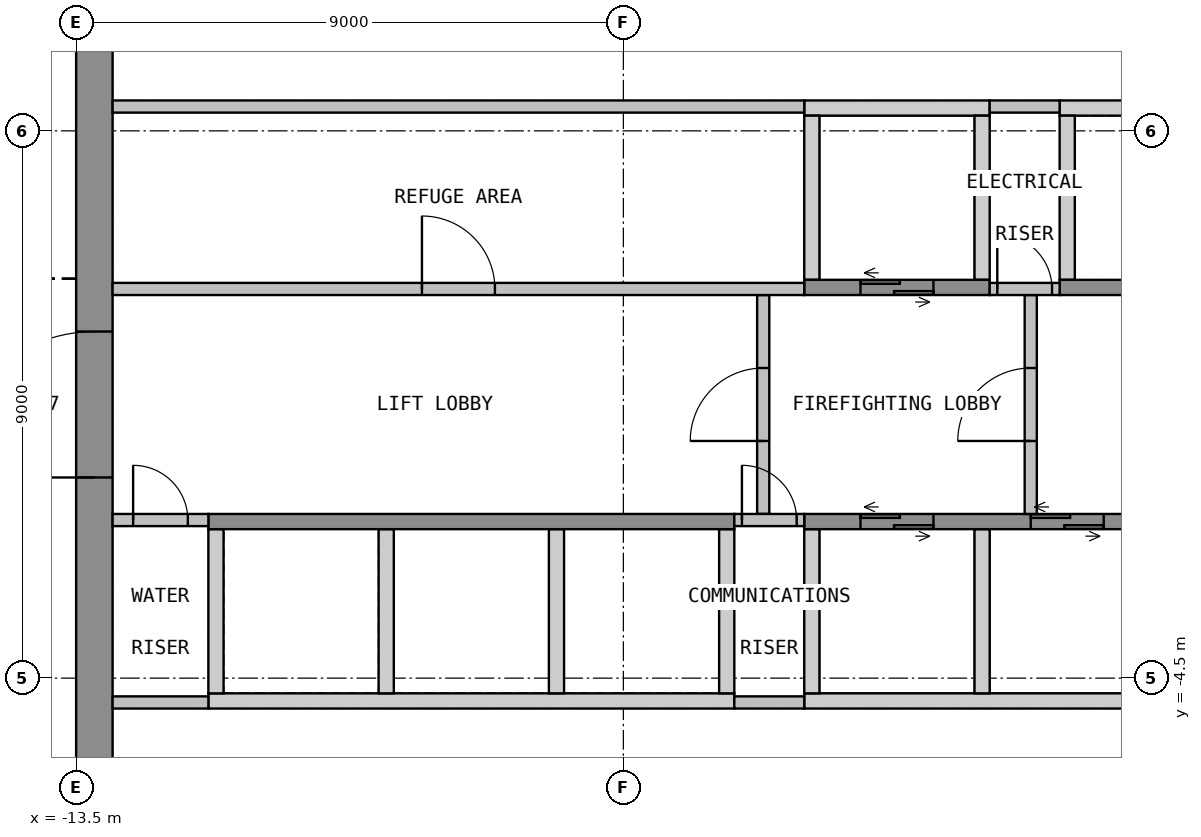
"""IFC4 building model, lengths in metres.
Left out: names, types, materials, properties, quantities, classifications, styles, units other than length and angle.
Written with IfcOpenShell. Run it as: python <this file> out.ifc"""

import sys

from ifc_helpers import new_model, si_unit, direction, frame, frame_2d, origin, place, context, subcontext, project, spatial, polyline, rectangle, outline, extrude, element, fill, save


model = new_model("IFC4")
c1 = context("Model", 3, precision=1e-05, world=origin(), true_north=direction((0.0, 1.0)))
c2 = subcontext(c1, "Body", "Model", "MODEL_VIEW")
j1 = project(units=[si_unit("LENGTHUNIT", "METRE"), si_unit("PLANEANGLEUNIT", "RADIAN")], contexts=[c1])
p1 = place(None, origin())
s1 = spatial("IfcSite", under=j1, at=p1, CompositionType="ELEMENT")
p2 = place(p1, origin())
s2 = spatial("IfcBuilding", under=s1, at=p2, CompositionType="ELEMENT")
p3 = place(p2, frame((0.0, 0.0, 230.7)))
s3 = spatial("IfcBuildingStorey", under=s2, at=p3, CompositionType="ELEMENT", Elevation=230.7)
p4 = place(p3, frame((-13.2, -10.65, 0.0), z_axis=(0.0, 0.0, 1.0), x_axis=(0.0, 1.0, 0.0)))
e1 = element("IfcWall", 1, at=p4, inside=s3, PredefinedType="SHEAR", context=c2, shape_type="SweptSolid", body=[
    extrude(rectangle(XDim=21.3, YDim=0.6, at=frame_2d((10.65, 0.0))), origin(), (0.0, 0.0, 1.0), 4.175),
])
p5 = place(p4, frame((9.45, 0.0, 0.0)))
e2 = element("IfcOpeningElement", 2, at=p5, cuts=e1, PredefinedType="OPENING", context=c2, shape_type="SweptSolid", body=[
    extrude(rectangle(XDim=2.4, YDim=2.1, at=frame_2d((1.2, 1.05))), frame((0.0, 0.31, 0.0), z_axis=(0.0, -1.0, 0.0), x_axis=(1.0, 0.0, 0.0)), (0.0, 0.0, 1.0), 0.62),
])
p6 = place(p3, origin())
e3 = element("IfcWall", 3, at=p6, inside=s3, PredefinedType="SHEAR", context=c2, shape_type="SweptSolid", body=[
    extrude(outline(polyline([(-1.525, 4.75), (1.525, 4.75), (1.525, 5.0), (-1.525, 5.0), (-1.525, 4.75)])), origin(), (0.0, 0.0, 1.0), 4.175),
])
p7 = place(p3, origin())
e4 = element("IfcWall", 4, at=p7, inside=s3, PredefinedType="SHEAR", context=c2, shape_type="SweptSolid", body=[
    extrude(outline(polyline([(2.675, 4.75), (8.525, 4.75), (8.525, 5.0), (2.675, 5.0), (2.675, 4.75)])), origin(), (0.0, 0.0, 1.0), 4.175),
])
p8 = place(p3, origin())
e5 = element("IfcWall", 5, at=p8, inside=s3, PredefinedType="SHEAR", context=c2, shape_type="SweptSolid", body=[
    extrude(outline(polyline([(-1.525, 2.05), (-1.275, 2.05), (-1.275, 4.75), (-1.525, 4.75), (-1.525, 2.05)])), origin(), (0.0, 0.0, 1.0), 4.175),
])
p9 = place(p3, origin())
e6 = element("IfcWall", 6, at=p9, inside=s3, PredefinedType="SHEAR", context=c2, shape_type="SweptSolid", body=[
    extrude(outline(polyline([(1.275, 2.05), (1.525, 2.05), (1.525, 4.75), (1.275, 4.75), (1.275, 2.05)])), origin(), (0.0, 0.0, 1.0), 4.175),
])
p10 = place(p3, origin())
e7 = element("IfcWall", 7, at=p10, inside=s3, PredefinedType="SHEAR", context=c2, shape_type="SweptSolid", body=[
    extrude(outline(polyline([(2.675, 2.05), (2.925, 2.05), (2.925, 4.75), (2.675, 4.75), (2.675, 2.05)])), origin(), (0.0, 0.0, 1.0), 4.175),
])
p11 = place(p3, frame((-1.525, 1.925, 0.0), z_axis=(0.0, 0.0, 1.0), x_axis=(1.0, 0.0, 0.0)))
e8 = element("IfcWall", 8, at=p11, inside=s3, PredefinedType="SHEAR", context=c2, shape_type="SweptSolid", body=[
    extrude(rectangle(XDim=3.05, YDim=0.25, at=frame_2d((1.525, 0.0))), origin(), (0.0, 0.0, 1.0), 4.175),
])
p12 = place(p11, frame((0.925, 0.0, 0.0)))
e9 = element("IfcOpeningElement", 9, at=p12, cuts=e8, PredefinedType="OPENING", context=c2, shape_type="SweptSolid", body=[
    extrude(rectangle(XDim=1.2, YDim=2.1, at=frame_2d((0.6, 1.05))), frame((0.0, 0.135, 0.0), z_axis=(0.0, -1.0, 0.0), x_axis=(1.0, 0.0, 0.0)), (0.0, 0.0, 1.0), 0.27),
])
p13 = place(p3, frame((2.675, 1.925, 0.0), z_axis=(0.0, 0.0, 1.0), x_axis=(1.0, 0.0, 0.0)))
e10 = element("IfcWall", 10, at=p13, inside=s3, PredefinedType="SHEAR", context=c2, shape_type="SweptSolid", body=[
    extrude(rectangle(XDim=5.85, YDim=0.25, at=frame_2d((2.925, 0.0))), origin(), (0.0, 0.0, 1.0), 4.175),
])
p14 = place(p3, origin())
e11 = element("IfcWall", 11, at=p14, inside=s3, PredefinedType="SHEAR", context=c2, shape_type="SweptSolid", body=[
    extrude(outline(polyline([(-11.325, -5.0), (-2.675, -5.0), (-2.675, -4.75), (-11.325, -4.75), (-11.325, -5.0)])), origin(), (0.0, 0.0, 1.0), 4.175),
])
p15 = place(p3, origin())
e12 = element("IfcWall", 12, at=p15, inside=s3, PredefinedType="SHEAR", context=c2, shape_type="SweptSolid", body=[
    extrude(outline(polyline([(-1.525, -5.0), (12.9, -5.0), (12.9, -4.75), (-1.525, -4.75), (-1.525, -5.0)])), origin(), (0.0, 0.0, 1.0), 4.175),
])
p16 = place(p3, origin())
e13 = element("IfcWall", 13, at=p16, inside=s3, PredefinedType="SHEAR", context=c2, shape_type="SweptSolid", body=[
    extrude(outline(polyline([(-11.325, -4.75), (-11.075, -4.75), (-11.075, -2.05), (-11.325, -2.05), (-11.325, -4.75)])), origin(), (0.0, 0.0, 1.0), 4.175),
])
p17 = place(p3, origin())
e14 = element("IfcWall", 14, at=p17, inside=s3, PredefinedType="SHEAR", context=c2, shape_type="SweptSolid", body=[
    extrude(outline(polyline([(-8.525, -4.75), (-8.275, -4.75), (-8.275, -2.05), (-8.525, -2.05), (-8.525, -4.75)])), origin(), (0.0, 0.0, 1.0), 4.175),
])
p18 = place(p3, origin())
e15 = element("IfcWall", 15, at=p18, inside=s3, PredefinedType="SHEAR", context=c2, shape_type="SweptSolid", body=[
    extrude(outline(polyline([(-5.725, -4.75), (-5.475, -4.75), (-5.475, -2.05), (-5.725, -2.05), (-5.725, -4.75)])), origin(), (0.0, 0.0, 1.0), 4.175),
])
p19 = place(p3, origin())
e16 = element("IfcWall", 16, at=p19, inside=s3, PredefinedType="SHEAR", context=c2, shape_type="SweptSolid", body=[
    extrude(outline(polyline([(-2.925, -4.75), (-2.675, -4.75), (-2.675, -2.05), (-2.925, -2.05), (-2.925, -4.75)])), origin(), (0.0, 0.0, 1.0), 4.175),
])
p20 = place(p3, origin())
e17 = element("IfcWall", 17, at=p20, inside=s3, PredefinedType="SHEAR", context=c2, shape_type="SweptSolid", body=[
    extrude(outline(polyline([(-1.525, -4.75), (-1.275, -4.75), (-1.275, -2.05), (-1.525, -2.05), (-1.525, -4.75)])), origin(), (0.0, 0.0, 1.0), 4.175),
])
p21 = place(p3, origin())
e18 = element("IfcWall", 18, at=p21, inside=s3, PredefinedType="SHEAR", context=c2, shape_type="SweptSolid", body=[
    extrude(outline(polyline([(1.275, -4.75), (1.525, -4.75), (1.525, -2.05), (1.275, -2.05), (1.275, -4.75)])), origin(), (0.0, 0.0, 1.0), 4.175),
])
p22 = place(p3, frame((-11.325, -1.925, 0.0), z_axis=(0.0, 0.0, 1.0), x_axis=(1.0, 0.0, 0.0)))
e19 = element("IfcWall", 19, at=p22, inside=s3, PredefinedType="SHEAR", context=c2, shape_type="SweptSolid", body=[
    extrude(rectangle(XDim=8.65, YDim=0.25, at=frame_2d((4.325, 0.0))), origin(), (0.0, 0.0, 1.0), 4.175),
])
p23 = place(p3, frame((-1.525, -1.925, 0.0), z_axis=(0.0, 0.0, 1.0), x_axis=(1.0, 0.0, 0.0)))
e20 = element("IfcWall", 20, at=p23, inside=s3, PredefinedType="SHEAR", context=c2, shape_type="SweptSolid", body=[
    extrude(rectangle(XDim=14.425, YDim=0.25, at=frame_2d((7.212, 0.0))), origin(), (0.0, 0.0, 1.0), 4.175),
])
p24 = place(p23, frame((0.925, 0.0, 0.0)))
e21 = element("IfcOpeningElement", 21, at=p24, cuts=e20, PredefinedType="OPENING", context=c2, shape_type="SweptSolid", body=[
    extrude(rectangle(XDim=1.2, YDim=2.1, at=frame_2d((0.6, 1.05))), frame((0.0, 0.135, 0.0), z_axis=(0.0, -1.0, 0.0), x_axis=(1.0, 0.0, 0.0)), (0.0, 0.0, 1.0), 0.27),
])
p25 = place(p23, frame((3.725, 0.0, 0.0)))
e22 = element("IfcOpeningElement", 22, at=p25, cuts=e20, PredefinedType="OPENING", context=c2, shape_type="SweptSolid", body=[
    extrude(rectangle(XDim=1.2, YDim=2.1, at=frame_2d((0.6, 1.05))), frame((0.0, 0.135, 0.0), z_axis=(0.0, -1.0, 0.0), x_axis=(1.0, 0.0, 0.0)), (0.0, 0.0, 1.0), 0.27),
])
p26 = place(p3, frame((-2.2, -1.8, 0.0), z_axis=(0.0, 0.0, 1.0), x_axis=(0.0, 1.0, 0.0)))
e23 = element("IfcWall", 23, at=p26, inside=s3, PredefinedType="PARTITIONING", context=c2, shape_type="SweptSolid", body=[
    extrude(rectangle(XDim=3.6, YDim=0.2, at=frame_2d((1.8, 0.0))), origin(), (0.0, 0.0, 1.0), 4.175),
])
p27 = place(p26, frame((1.2, 0.0, 0.0)))
e24 = element("IfcOpeningElement", 24, at=p27, cuts=e23, PredefinedType="OPENING", context=c2, shape_type="SweptSolid", body=[
    extrude(rectangle(XDim=1.2, YDim=2.1, at=frame_2d((0.6, 1.05))), frame((0.0, 0.11, 0.0), z_axis=(0.0, -1.0, 0.0), x_axis=(1.0, 0.0, 0.0)), (0.0, 0.0, 1.0), 0.22),
])
p28 = place(p3, frame((2.2, -1.8, 0.0), z_axis=(0.0, 0.0, 1.0), x_axis=(0.0, 1.0, 0.0)))
e25 = element("IfcWall", 25, at=p28, inside=s3, PredefinedType="PARTITIONING", context=c2, shape_type="SweptSolid", body=[
    extrude(rectangle(XDim=3.6, YDim=0.2, at=frame_2d((1.8, 0.0))), origin(), (0.0, 0.0, 1.0), 4.175),
])
p29 = place(p28, frame((1.2, 0.0, 0.0)))
e26 = element("IfcOpeningElement", 26, at=p29, cuts=e25, PredefinedType="OPENING", context=c2, shape_type="SweptSolid", body=[
    extrude(rectangle(XDim=1.2, YDim=2.1, at=frame_2d((0.6, 1.05))), frame((0.0, 0.11, 0.0), z_axis=(0.0, -1.0, 0.0), x_axis=(1.0, 0.0, 0.0)), (0.0, 0.0, 1.0), 0.22),
])
p30 = place(p3, frame((-12.9, 1.9, 0.0), z_axis=(0.0, 0.0, 1.0), x_axis=(1.0, 0.0, 0.0)))
e27 = element("IfcWall", 27, at=p30, inside=s3, PredefinedType="PARTITIONING", context=c2, shape_type="SweptSolid", body=[
    extrude(rectangle(XDim=11.375, YDim=0.2, at=frame_2d((5.688, 0.0))), origin(), (0.0, 0.0, 1.0), 4.175),
])
p31 = place(p30, frame((5.087, 0.0, 0.0)))
e28 = element("IfcOpeningElement", 28, at=p31, cuts=e27, PredefinedType="OPENING", context=c2, shape_type="SweptSolid", body=[
    extrude(rectangle(XDim=1.2, YDim=2.1, at=frame_2d((0.6, 1.05))), frame((0.0, 0.11, 0.0), z_axis=(0.0, -1.0, 0.0), x_axis=(1.0, 0.0, 0.0)), (0.0, 0.0, 1.0), 0.22),
])
p32 = place(p3, frame((-12.9, 4.9, 0.0), z_axis=(0.0, 0.0, 1.0), x_axis=(1.0, 0.0, 0.0)))
e29 = element("IfcWall", 29, at=p32, inside=s3, PredefinedType="PARTITIONING", context=c2, shape_type="SweptSolid", body=[
    extrude(rectangle(XDim=11.375, YDim=0.2, at=frame_2d((5.688, 0.0))), origin(), (0.0, 0.0, 1.0), 4.175),
])
p33 = place(p3, frame((1.525, 1.9, 0.0), z_axis=(0.0, 0.0, 1.0), x_axis=(1.0, 0.0, 0.0)))
e30 = element("IfcWall", 30, at=p33, inside=s3, PredefinedType="PARTITIONING", context=c2, shape_type="SweptSolid", body=[
    extrude(rectangle(XDim=1.15, YDim=0.2, at=frame_2d((0.575, 0.0))), origin(), (0.0, 0.0, 1.0), 4.175),
])
p34 = place(p33, frame((0.125, 0.0, 0.0)))
e31 = element("IfcOpeningElement", 31, at=p34, cuts=e30, PredefinedType="OPENING", context=c2, shape_type="SweptSolid", body=[
    extrude(rectangle(XDim=0.9, YDim=2.1, at=frame_2d((0.45, 1.05))), frame((0.0, 0.11, 0.0), z_axis=(0.0, -1.0, 0.0), x_axis=(1.0, 0.0, 0.0)), (0.0, 0.0, 1.0), 0.22),
])
p35 = place(p3, frame((1.525, 4.9, 0.0), z_axis=(0.0, 0.0, 1.0), x_axis=(1.0, 0.0, 0.0)))
e32 = element("IfcWall", 32, at=p35, inside=s3, PredefinedType="PARTITIONING", context=c2, shape_type="SweptSolid", body=[
    extrude(rectangle(XDim=1.15, YDim=0.2, at=frame_2d((0.575, 0.0))), origin(), (0.0, 0.0, 1.0), 4.175),
])
p36 = place(p3, frame((-12.9, -1.9, 0.0), z_axis=(0.0, 0.0, 1.0), x_axis=(1.0, 0.0, 0.0)))
e33 = element("IfcWall", 33, at=p36, inside=s3, PredefinedType="PARTITIONING", context=c2, shape_type="SweptSolid", body=[
    extrude(rectangle(XDim=1.575, YDim=0.2, at=frame_2d((0.788, 0.0))), origin(), (0.0, 0.0, 1.0), 4.175),
])
p37 = place(p36, frame((0.337, 0.0, 0.0)))
e34 = element("IfcOpeningElement", 34, at=p37, cuts=e33, PredefinedType="OPENING", context=c2, shape_type="SweptSolid", body=[
    extrude(rectangle(XDim=0.9, YDim=2.1, at=frame_2d((0.45, 1.05))), frame((0.0, 0.11, 0.0), z_axis=(0.0, -1.0, 0.0), x_axis=(1.0, 0.0, 0.0)), (0.0, 0.0, 1.0), 0.22),
])
p38 = place(p3, frame((-12.9, -4.9, 0.0), z_axis=(0.0, 0.0, 1.0), x_axis=(1.0, 0.0, 0.0)))
e35 = element("IfcWall", 35, at=p38, inside=s3, PredefinedType="PARTITIONING", context=c2, shape_type="SweptSolid", body=[
    extrude(rectangle(XDim=1.575, YDim=0.2, at=frame_2d((0.788, 0.0))), origin(), (0.0, 0.0, 1.0), 4.175),
])
p39 = place(p3, frame((-2.675, -1.9, 0.0), z_axis=(0.0, 0.0, 1.0), x_axis=(1.0, 0.0, 0.0)))
e36 = element("IfcWall", 36, at=p39, inside=s3, PredefinedType="PARTITIONING", context=c2, shape_type="SweptSolid", body=[
    extrude(rectangle(XDim=1.15, YDim=0.2, at=frame_2d((0.575, 0.0))), origin(), (0.0, 0.0, 1.0), 4.175),
])
p40 = place(p39, frame((0.125, 0.0, 0.0)))
e37 = element("IfcOpeningElement", 37, at=p40, cuts=e36, PredefinedType="OPENING", context=c2, shape_type="SweptSolid", body=[
    extrude(rectangle(XDim=0.9, YDim=2.1, at=frame_2d((0.45, 1.05))), frame((0.0, 0.11, 0.0), z_axis=(0.0, -1.0, 0.0), x_axis=(1.0, 0.0, 0.0)), (0.0, 0.0, 1.0), 0.22),
])
p41 = place(p3, frame((-2.675, -4.9, 0.0), z_axis=(0.0, 0.0, 1.0), x_axis=(1.0, 0.0, 0.0)))
e38 = element("IfcWall", 38, at=p41, inside=s3, PredefinedType="PARTITIONING", context=c2, shape_type="SweptSolid", body=[
    extrude(rectangle(XDim=1.15, YDim=0.2, at=frame_2d((0.575, 0.0))), origin(), (0.0, 0.0, 1.0), 4.175),
])
p42 = place(p5, origin())
e39 = element("IfcDoor", 39, at=p42, inside=s3, OperationType="DOUBLE_DOOR_DOUBLE_SWING", PredefinedType="DOOR", context=c2, shape_type="SweptSolid", body=[
    extrude(rectangle(XDim=2.4, YDim=2.1, at=frame_2d((1.2, 1.05))), frame((0.0, 0.025, 0.0), z_axis=(0.0, -1.0, 0.0), x_axis=(1.0, 0.0, 0.0)), (0.0, 0.0, 1.0), 0.05),
])
fill(e2, e39)
p43 = place(p12, origin())
e40 = element("IfcDoor", 40, at=p43, inside=s3, OperationType="DOUBLE_DOOR_SLIDING", PredefinedType="DOOR", context=c2, shape_type="SweptSolid", body=[
    extrude(rectangle(XDim=1.2, YDim=2.1, at=frame_2d((0.6, 1.05))), frame((0.0, 0.025, 0.0), z_axis=(0.0, -1.0, 0.0), x_axis=(1.0, 0.0, 0.0)), (0.0, 0.0, 1.0), 0.05),
])
fill(e9, e40)
p44 = place(p24, origin())
e41 = element("IfcDoor", 41, at=p44, inside=s3, OperationType="DOUBLE_DOOR_SLIDING", PredefinedType="DOOR", context=c2, shape_type="SweptSolid", body=[
    extrude(rectangle(XDim=1.2, YDim=2.1, at=frame_2d((0.6, 1.05))), frame((0.0, 0.025, 0.0), z_axis=(0.0, -1.0, 0.0), x_axis=(1.0, 0.0, 0.0)), (0.0, 0.0, 1.0), 0.05),
])
fill(e21, e41)
p45 = place(p25, origin())
e42 = element("IfcDoor", 42, at=p45, inside=s3, OperationType="DOUBLE_DOOR_SLIDING", PredefinedType="DOOR", context=c2, shape_type="SweptSolid", body=[
    extrude(rectangle(XDim=1.2, YDim=2.1, at=frame_2d((0.6, 1.05))), frame((0.0, 0.025, 0.0), z_axis=(0.0, -1.0, 0.0), x_axis=(1.0, 0.0, 0.0)), (0.0, 0.0, 1.0), 0.05),
])
fill(e22, e42)
p46 = place(p27, origin())
e43 = element("IfcDoor", 43, at=p46, inside=s3, OperationType="SINGLE_SWING_LEFT", PredefinedType="DOOR", context=c2, shape_type="SweptSolid", body=[
    extrude(rectangle(XDim=1.2, YDim=2.1, at=frame_2d((0.6, 1.05))), frame((0.0, 0.025, 0.0), z_axis=(0.0, -1.0, 0.0), x_axis=(1.0, 0.0, 0.0)), (0.0, 0.0, 1.0), 0.05),
])
fill(e24, e43)
p47 = place(p29, origin())
e44 = element("IfcDoor", 44, at=p47, inside=s3, OperationType="SINGLE_SWING_LEFT", PredefinedType="DOOR", context=c2, shape_type="SweptSolid", body=[
    extrude(rectangle(XDim=1.2, YDim=2.1, at=frame_2d((0.6, 1.05))), frame((0.0, 0.025, 0.0), z_axis=(0.0, -1.0, 0.0), x_axis=(1.0, 0.0, 0.0)), (0.0, 0.0, 1.0), 0.05),
])
fill(e26, e44)
p48 = place(p31, origin())
e45 = element("IfcDoor", 45, at=p48, inside=s3, OperationType="SINGLE_SWING_RIGHT", PredefinedType="DOOR", context=c2, shape_type="SweptSolid", body=[
    extrude(rectangle(XDim=1.2, YDim=2.1, at=frame_2d((0.6, 1.05))), frame((0.0, 0.025, 0.0), z_axis=(0.0, -1.0, 0.0), x_axis=(1.0, 0.0, 0.0)), (0.0, 0.0, 1.0), 0.05),
])
fill(e28, e45)
p49 = place(p34, origin())
e46 = element("IfcDoor", 46, at=p49, inside=s3, OperationType="SINGLE_SWING_LEFT", PredefinedType="DOOR", context=c2, shape_type="SweptSolid", body=[
    extrude(rectangle(XDim=0.9, YDim=2.1, at=frame_2d((0.45, 1.05))), frame((0.0, 0.025, 0.0), z_axis=(0.0, -1.0, 0.0), x_axis=(1.0, 0.0, 0.0)), (0.0, 0.0, 1.0), 0.05),
])
fill(e31, e46)
p50 = place(p37, origin())
e47 = element("IfcDoor", 47, at=p50, inside=s3, OperationType="SINGLE_SWING_LEFT", PredefinedType="DOOR", context=c2, shape_type="SweptSolid", body=[
    extrude(rectangle(XDim=0.9, YDim=2.1, at=frame_2d((0.45, 1.05))), frame((0.0, 0.025, 0.0), z_axis=(0.0, -1.0, 0.0), x_axis=(1.0, 0.0, 0.0)), (0.0, 0.0, 1.0), 0.05),
])
fill(e34, e47)
p51 = place(p40, origin())
e48 = element("IfcDoor", 48, at=p51, inside=s3, OperationType="SINGLE_SWING_LEFT", PredefinedType="DOOR", context=c2, shape_type="SweptSolid", body=[
    extrude(rectangle(XDim=0.9, YDim=2.1, at=frame_2d((0.45, 1.05))), frame((0.0, 0.025, 0.0), z_axis=(0.0, -1.0, 0.0), x_axis=(1.0, 0.0, 0.0)), (0.0, 0.0, 1.0), 0.05),
])
fill(e37, e48)
save(model, sys.argv[1])
